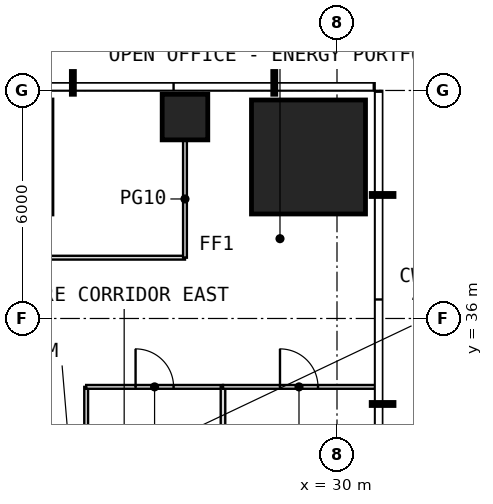
"""IFC4 building model, lengths in metres.
Left out: names, types, materials, properties, quantities, classifications, styles, units other than length and angle.
Written with IfcOpenShell. Run it as: python <this file> out.ifc"""

import sys

from ifc_helpers import new_model, si_unit, direction, frame, frame_2d, origin, origin_2d, place, context, subcontext, project, spatial, rectangle, extrude, element, fill, save


model = new_model("IFC4")
c1 = context("Model", 3, precision=1e-05, world=origin(), true_north=direction((0.0, 1.0)))
c2 = subcontext(c1, "Body", "Model", "MODEL_VIEW")
j1 = project(units=[si_unit("LENGTHUNIT", "METRE"), si_unit("PLANEANGLEUNIT", "RADIAN")], contexts=[c1])
p1 = place(None, origin())
s1 = spatial("IfcSite", under=j1, at=p1, CompositionType="ELEMENT")
p2 = place(p1, origin())
s2 = spatial("IfcBuilding", under=s1, at=p2, CompositionType="ELEMENT")
p3 = place(p2, frame((0.0, 0.0, 124.5)))
s3 = spatial("IfcBuildingStorey", under=s2, at=p3, CompositionType="ELEMENT", Elevation=124.5)
p4 = place(p3, frame((26.0, 41.3, 0.0), z_axis=(0.0, 0.0, 1.0), x_axis=(1.0, 0.0, 0.0)))
e1 = element("IfcColumn", 1, at=p4, inside=s3, PredefinedType="COLUMN", context=c2, shape_type="SweptSolid", body=[
    extrude(rectangle(XDim=1.2, YDim=1.2, at=origin_2d()), origin(), (0.0, 0.0, 1.0), 4.0),
])
p5 = place(p3, frame((29.25, 40.25, 0.0), z_axis=(0.0, 0.0, 1.0), x_axis=(1.0, 0.0, 0.0)))
e2 = element("IfcColumn", 2, at=p5, inside=s3, PredefinedType="COLUMN", context=c2, shape_type="SweptSolid", body=[
    extrude(rectangle(XDim=3.0, YDim=3.0, at=origin_2d()), origin(), (0.0, 0.0, 1.0), 4.0),
])
p6 = place(p3, frame((16.0, 37.6, 0.0), z_axis=(0.0, 0.0, 1.0), x_axis=(1.0, 0.0, 0.0)))
e3 = element("IfcWall", 3, at=p6, inside=s3, PredefinedType="PARTITIONING", context=c2, shape_type="SweptSolid", body=[
    extrude(rectangle(XDim=10.0, YDim=0.1, at=frame_2d((5.0, 0.0))), origin(), (0.0, 0.0, 1.0), 3.75),
])
p7 = place(p6, frame((2.4, 0.0, 0.0)))
e4 = element("IfcOpeningElement", 4, at=p7, cuts=e3, PredefinedType="OPENING", context=c2, shape_type="SweptSolid", body=[
    extrude(rectangle(XDim=1.0, YDim=2.4, at=frame_2d((0.5, 1.2))), frame((0.0, 0.06, 0.0), z_axis=(0.0, -1.0, 0.0), x_axis=(1.0, 0.0, 0.0)), (0.0, 0.0, 1.0), 0.12),
])
p8 = place(p3, frame((23.4, 31.05, 0.0), z_axis=(0.0, 0.0, 1.0), x_axis=(0.0, 1.0, 0.0)))
e5 = element("IfcWall", 5, at=p8, inside=s3, PredefinedType="PARTITIONING", context=c2, shape_type="SweptSolid", body=[
    extrude(rectangle(XDim=3.15, YDim=0.1, at=frame_2d((1.575, 0.0))), origin(), (0.0, 0.0, 1.0), 3.75),
])
p9 = place(p3, frame((23.4, 34.2, 0.0), z_axis=(0.0, 0.0, 1.0), x_axis=(1.0, 0.0, 0.0)))
e6 = element("IfcWall", 6, at=p9, inside=s3, PredefinedType="PARTITIONING", context=c2, shape_type="SweptSolid", body=[
    extrude(rectangle(XDim=3.6, YDim=0.1, at=frame_2d((1.8, 0.0))), origin(), (0.0, 0.0, 1.0), 3.75),
])
p10 = place(p9, frame((1.3, 0.0, 0.0)))
e7 = element("IfcOpeningElement", 7, at=p10, cuts=e6, PredefinedType="OPENING", context=c2, shape_type="SweptSolid", body=[
    extrude(rectangle(XDim=1.0, YDim=2.4, at=frame_2d((0.5, 1.2))), frame((0.0, 0.06, 0.0), z_axis=(0.0, -1.0, 0.0), x_axis=(1.0, 0.0, 0.0)), (0.0, 0.0, 1.0), 0.12),
])
p11 = place(p3, frame((26.0, 37.6, 0.0), z_axis=(0.0, 0.0, 1.0), x_axis=(0.0, 1.0, 0.0)))
e8 = element("IfcWall", 8, at=p11, inside=s3, PredefinedType="PARTITIONING", context=c2, shape_type="SweptSolid", body=[
    extrude(rectangle(XDim=3.09, YDim=0.1, at=frame_2d((1.545, 0.0))), origin(), (0.0, 0.0, 1.0), 3.75),
])
p12 = place(p3, frame((27.0, 31.05, 0.0), z_axis=(0.0, 0.0, 1.0), x_axis=(0.0, 1.0, 0.0)))
e9 = element("IfcWall", 9, at=p12, inside=s3, PredefinedType="PARTITIONING", context=c2, shape_type="SweptSolid", body=[
    extrude(rectangle(XDim=3.15, YDim=0.12, at=frame_2d((1.575, 0.0))), origin(), (0.0, 0.0, 1.0), 3.75),
])
p13 = place(p3, frame((27.0, 34.2, 0.0), z_axis=(0.0, 0.0, 1.0), x_axis=(1.0, 0.0, 0.0)))
e10 = element("IfcWall", 10, at=p13, inside=s3, PredefinedType="PARTITIONING", context=c2, shape_type="SweptSolid", body=[
    extrude(rectangle(XDim=4.0, YDim=0.1, at=frame_2d((2.0, 0.0))), origin(), (0.0, 0.0, 1.0), 3.75),
])
p14 = place(p13, frame((1.5, 0.0, 0.0)))
e11 = element("IfcOpeningElement", 11, at=p14, cuts=e10, PredefinedType="OPENING", context=c2, shape_type="SweptSolid", body=[
    extrude(rectangle(XDim=1.0, YDim=2.4, at=frame_2d((0.5, 1.2))), frame((0.0, 0.06, 0.0), z_axis=(0.0, -1.0, 0.0), x_axis=(1.0, 0.0, 0.0)), (0.0, 0.0, 1.0), 0.12),
])
p15 = place(p10, origin())
e12 = element("IfcDoor", 12, at=p15, inside=s3, OperationType="SINGLE_SWING_LEFT", PredefinedType="DOOR", context=c2, shape_type="SweptSolid", body=[
    extrude(rectangle(XDim=1.0, YDim=2.4, at=frame_2d((0.5, 1.2))), frame((0.0, 0.025, 0.0), z_axis=(0.0, -1.0, 0.0), x_axis=(1.0, 0.0, 0.0)), (0.0, 0.0, 1.0), 0.05),
])
fill(e7, e12)
p16 = place(p14, origin())
e13 = element("IfcDoor", 13, at=p16, inside=s3, OperationType="SINGLE_SWING_LEFT", PredefinedType="DOOR", context=c2, shape_type="SweptSolid", body=[
    extrude(rectangle(XDim=1.0, YDim=2.4, at=frame_2d((0.5, 1.2))), frame((0.0, 0.025, 0.0), z_axis=(0.0, -1.0, 0.0), x_axis=(1.0, 0.0, 0.0)), (0.0, 0.0, 1.0), 0.05),
])
fill(e11, e13)
save(model, sys.argv[1])
